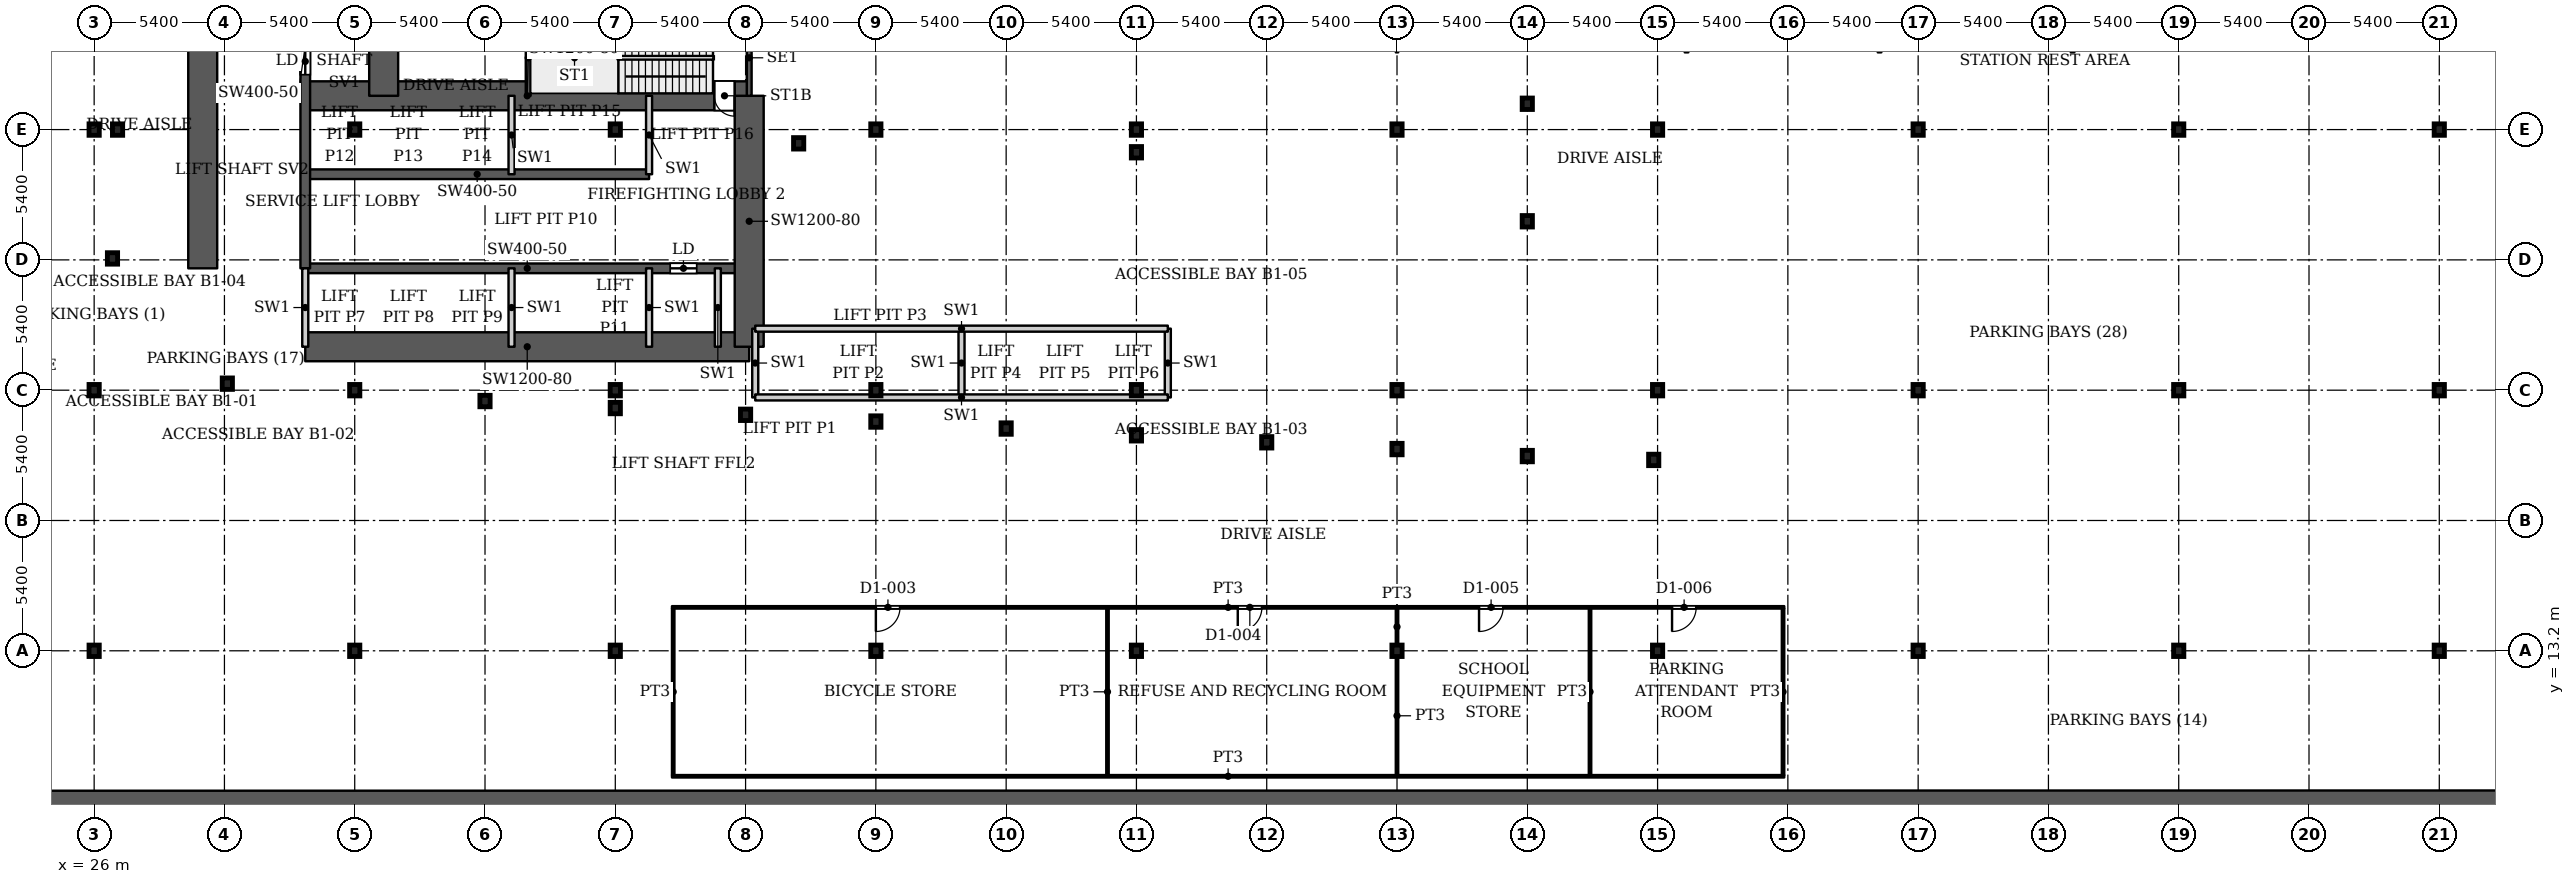
"""IFC4 building model, lengths in metres.
Left out: names, types, materials, properties, quantities, classifications, styles, units other than length and angle.
Written with IfcOpenShell. Run it as: python <this file> out.ifc"""

import sys

from ifc_helpers import new_model, si_unit, direction, frame, frame_2d, origin, origin_2d, place, context, subcontext, project, spatial, rectangle, i_section, extrude, source, transform, mapped, element, fill, save


model = new_model("IFC4")
c1 = context("Model", 3, precision=1e-05, world=origin(), true_north=direction((0.0, 1.0)))
c2 = subcontext(c1, "Body", "Model", "MODEL_VIEW")
j1 = project(units=[si_unit("LENGTHUNIT", "METRE"), si_unit("PLANEANGLEUNIT", "RADIAN")], contexts=[c1])
p1 = place(None, origin())
s1 = spatial("IfcSite", under=j1, at=p1, CompositionType="ELEMENT")
p2 = place(p1, origin())
s2 = spatial("IfcBuilding", under=s1, at=p2, CompositionType="ELEMENT")
p3 = place(p2, frame((0.0, 0.0, -5.0)))
s3 = spatial("IfcBuildingStorey", under=s2, at=p3, CompositionType="ELEMENT", Elevation=-5.0)
for number, where, z_axis, x_axis in (
    (1, (26.0, 13.2, 0.0), (0.0, 0.0, 1.0), (1.0, 0.0, 0.0)),
    (2, (36.8, 13.2, 0.0), (0.0, 0.0, 1.0), (1.0, 0.0, 0.0)),
    (3, (47.6, 13.2, 0.0), (0.0, 0.0, 1.0), (1.0, 0.0, 0.0)),
    (4, (58.4, 13.2, 0.0), (0.0, 0.0, 1.0), (1.0, 0.0, 0.0)),
    (5, (69.2, 13.2, 0.0), (0.0, 0.0, 1.0), (1.0, 0.0, 0.0)),
    (6, (80.0, 13.2, 0.0), (0.0, 0.0, 1.0), (1.0, 0.0, 0.0)),
    (7, (90.8, 13.2, 0.0), (0.0, 0.0, 1.0), (1.0, 0.0, 0.0)),
    (8, (101.6, 13.2, 0.0), (0.0, 0.0, 1.0), (1.0, 0.0, 0.0)),
    (9, (112.4, 13.2, 0.0), (0.0, 0.0, 1.0), (1.0, 0.0, 0.0)),
    (10, (123.2, 13.2, 0.0), (0.0, 0.0, 1.0), (1.0, 0.0, 0.0)),
    (11, (26.0, 24.0, 0.0), (0.0, 0.0, 1.0), (1.0, 0.0, 0.0)),
    (12, (36.8, 24.0, 0.0), (0.0, 0.0, 1.0), (1.0, 0.0, 0.0)),
    (13, (47.6, 24.0, 0.0), (0.0, 0.0, 1.0), (1.0, 0.0, 0.0)),
    (14, (58.4, 24.0, 0.0), (0.0, 0.0, 1.0), (1.0, 0.0, 0.0)),
    (15, (69.2, 24.0, 0.0), (0.0, 0.0, 1.0), (1.0, 0.0, 0.0)),
    (16, (80.0, 24.0, 0.0), (0.0, 0.0, 1.0), (1.0, 0.0, 0.0)),
    (17, (90.8, 24.0, 0.0), (0.0, 0.0, 1.0), (1.0, 0.0, 0.0)),
    (18, (101.6, 24.0, 0.0), (0.0, 0.0, 1.0), (1.0, 0.0, 0.0)),
    (19, (112.4, 24.0, 0.0), (0.0, 0.0, 1.0), (1.0, 0.0, 0.0)),
    (20, (123.2, 24.0, 0.0), (0.0, 0.0, 1.0), (1.0, 0.0, 0.0)),
    (21, (26.0, 34.8, 0.0), (0.0, 0.0, 1.0), (1.0, 0.0, 0.0)),
    (22, (36.8, 34.8, 0.0), (0.0, 0.0, 1.0), (1.0, 0.0, 0.0)),
    (23, (47.6, 34.8, 0.0), (0.0, 0.0, 1.0), (1.0, 0.0, 0.0)),
    (24, (58.4, 34.8, 0.0), (0.0, 0.0, 1.0), (1.0, 0.0, 0.0)),
    (25, (69.2, 34.8, 0.0), (0.0, 0.0, 1.0), (1.0, 0.0, 0.0)),
    (26, (80.0, 34.8, 0.0), (0.0, 0.0, 1.0), (1.0, 0.0, 0.0)),
    (27, (90.8, 34.8, 0.0), (0.0, 0.0, 1.0), (1.0, 0.0, 0.0)),
    (28, (101.6, 34.8, 0.0), (0.0, 0.0, 1.0), (1.0, 0.0, 0.0)),
    (29, (112.4, 34.8, 0.0), (0.0, 0.0, 1.0), (1.0, 0.0, 0.0)),
    (30, (123.2, 34.8, 0.0), (0.0, 0.0, 1.0), (1.0, 0.0, 0.0)),
    (31, (90.64, 21.11, 0.0), (0.0, 0.0, 1.0), (1.0, 0.0, 0.0)),
    (32, (85.4, 21.27, 0.0), (0.0, 0.0, 1.0), (1.0, 0.0, 0.0)),
    (33, (80.0, 21.56, 0.0), (0.0, 0.0, 1.0), (1.0, 0.0, 0.0)),
    (34, (74.6, 21.84, 0.0), (0.0, 0.0, 1.0), (1.0, 0.0, 0.0)),
    (35, (69.2, 22.13, 0.0), (0.0, 0.0, 1.0), (1.0, 0.0, 0.0)),
    (36, (63.8, 22.41, 0.0), (0.0, 0.0, 1.0), (1.0, 0.0, 0.0)),
    (37, (58.4, 22.7, 0.0), (0.0, 0.0, 1.0), (1.0, 0.0, 0.0)),
    (38, (53.0, 22.98, 0.0), (0.0, 0.0, 1.0), (1.0, 0.0, 0.0)),
    (39, (47.6, 23.26, 0.0), (0.0, 0.0, 1.0), (1.0, 0.0, 0.0)),
    (40, (42.2, 23.55, 0.0), (0.0, 0.0, 1.0), (1.0, 0.0, 0.0)),
    (41, (31.52, 24.27, 0.0), (0.0, 0.0, 1.0), (1.0, 0.0, 0.0)),
    (42, (26.76, 29.46, 0.0), (0.0, 0.0, 1.0), (1.0, 0.0, 0.0)),
    (43, (26.97, 34.8, 0.0), (0.0, 0.0, 1.0), (1.0, 0.0, 0.0)),
    (44, (85.4, 31.0, 0.0), (0.0, 0.0, 1.0), (1.0, 0.0, 0.0)),
    (45, (69.2, 33.86, 0.0), (0.0, 0.0, 1.0), (1.0, 0.0, 0.0)),
    (46, (55.2, 34.23, 0.0), (0.0, 0.0, 1.0), (1.0, 0.0, 0.0)),
    (47, (85.4, 35.87, 0.0), (0.0, 0.0, 1.0), (1.0, 0.0, 0.0)),
):
    element("IfcColumn", number, at=place(p3, frame(where, z_axis=z_axis, x_axis=x_axis)), inside=s3, PredefinedType="COLUMN", context=c2, shape_type="SweptSolid", body=[
        extrude(i_section(OverallWidth=0.424, OverallDepth=0.474, WebThickness=0.048, FlangeThickness=0.077, FilletRadius=0.014, at=origin_2d()), origin(), (0.0, 0.0, 1.0), 5.0),
    ])
p4 = place(p3, frame((34.75, 25.8, 0.0), z_axis=(0.0, 0.0, 1.0), x_axis=(1.0, 0.0, 0.0)))
e48 = element("IfcWall", 48, at=p4, inside=s3, PredefinedType="SHEAR", context=c2, shape_type="SweptSolid", body=[
    extrude(rectangle(XDim=18.4, YDim=1.2, at=frame_2d((9.2, 0.0))), origin(), (0.0, 0.0, 1.0), 5.0),
])
p5 = place(p3, frame((34.75, 29.05, 0.0), z_axis=(0.0, 0.0, 1.0), x_axis=(1.0, 0.0, 0.0)))
e49 = element("IfcWall", 49, at=p5, inside=s3, PredefinedType="SHEAR", context=c2, shape_type="SweptSolid", body=[
    extrude(rectangle(XDim=18.4, YDim=0.4, at=frame_2d((9.2, 0.0))), origin(), (0.0, 0.0, 1.0), 5.0),
])
p6 = place(p5, frame((15.125, 0.0, 0.0)))
e50 = element("IfcOpeningElement", 50, at=p6, cuts=e49, PredefinedType="OPENING", context=c2, shape_type="SweptSolid", body=[
    extrude(rectangle(XDim=1.1, YDim=2.2, at=frame_2d((0.55, 1.1))), frame((0.0, 0.21, 0.0), z_axis=(0.0, -1.0, 0.0), x_axis=(1.0, 0.0, 0.0)), (0.0, 0.0, 1.0), 0.42),
])
p7 = place(p3, frame((34.75, 32.95, 0.0), z_axis=(0.0, 0.0, 1.0), x_axis=(1.0, 0.0, 0.0)))
e51 = element("IfcWall", 51, at=p7, inside=s3, PredefinedType="SHEAR", context=c2, shape_type="SweptSolid", body=[
    extrude(rectangle(XDim=14.25, YDim=0.4, at=frame_2d((7.125, 0.0))), origin(), (0.0, 0.0, 1.0), 5.0),
])
p8 = place(p3, frame((34.75, 36.2, 0.0), z_axis=(0.0, 0.0, 1.0), x_axis=(1.0, 0.0, 0.0)))
e52 = element("IfcWall", 52, at=p8, inside=s3, PredefinedType="SHEAR", context=c2, shape_type="SweptSolid", body=[
    extrude(rectangle(XDim=18.4, YDim=1.2, at=frame_2d((9.2, 0.0))), origin(), (0.0, 0.0, 1.0), 5.0),
])
p9 = place(p8, frame((16.955, 0.0, 0.0)))
e53 = element("IfcOpeningElement", 53, at=p9, cuts=e52, PredefinedType="OPENING", context=c2, shape_type="SweptSolid", body=[
    extrude(rectangle(XDim=0.843, YDim=2.2, at=frame_2d((0.421, 1.1))), frame((0.0, 0.61, 0.0), z_axis=(0.0, -1.0, 0.0), x_axis=(1.0, 0.0, 0.0)), (0.0, 0.0, 1.0), 1.22),
])
p10 = place(p3, frame((34.75, 29.05, 0.0), z_axis=(0.0, 0.0, 1.0), x_axis=(0.0, 1.0, 0.0)))
e54 = element("IfcWall", 54, at=p10, inside=s3, PredefinedType="SHEAR", context=c2, shape_type="SweptSolid", body=[
    extrude(rectangle(XDim=18.45, YDim=0.4, at=frame_2d((9.225, 0.0))), origin(), (0.0, 0.0, 1.0), 5.0),
])
p11 = place(p10, frame((8.025, 0.0, 0.0)))
e55 = element("IfcOpeningElement", 55, at=p11, cuts=e54, PredefinedType="OPENING", context=c2, shape_type="SweptSolid", body=[
    extrude(rectangle(XDim=1.1, YDim=2.2, at=frame_2d((0.55, 1.1))), frame((0.0, 0.21, 0.0), z_axis=(0.0, -1.0, 0.0), x_axis=(1.0, 0.0, 0.0)), (0.0, 0.0, 1.0), 0.42),
])
p12 = place(p10, frame((10.875, 0.0, 0.0)))
e56 = element("IfcOpeningElement", 56, at=p12, cuts=e54, PredefinedType="OPENING", context=c2, shape_type="SweptSolid", body=[
    extrude(rectangle(XDim=1.1, YDim=2.2, at=frame_2d((0.55, 1.1))), frame((0.0, 0.21, 0.0), z_axis=(0.0, -1.0, 0.0), x_axis=(1.0, 0.0, 0.0)), (0.0, 0.0, 1.0), 0.42),
])
p13 = place(p10, frame((13.725, 0.0, 0.0)))
e57 = element("IfcOpeningElement", 57, at=p13, cuts=e54, PredefinedType="OPENING", context=c2, shape_type="SweptSolid", body=[
    extrude(rectangle(XDim=1.1, YDim=2.2, at=frame_2d((0.55, 1.1))), frame((0.0, 0.21, 0.0), z_axis=(0.0, -1.0, 0.0), x_axis=(1.0, 0.0, 0.0)), (0.0, 0.0, 1.0), 0.42),
])
p14 = place(p10, frame((15.95, 0.0, 0.0)))
e58 = element("IfcOpeningElement", 58, at=p14, cuts=e54, PredefinedType="OPENING", context=c2, shape_type="SweptSolid", body=[
    extrude(rectangle(XDim=1.1, YDim=2.2, at=frame_2d((0.55, 1.1))), frame((0.0, 0.21, 0.0), z_axis=(0.0, -1.0, 0.0), x_axis=(1.0, 0.0, 0.0)), (0.0, 0.0, 1.0), 0.42),
])
p15 = place(p3, frame((38.0, 36.2, 0.0), z_axis=(0.0, 0.0, 1.0), x_axis=(0.0, 1.0, 0.0)))
e59 = element("IfcWall", 59, at=p15, inside=s3, PredefinedType="SHEAR", context=c2, shape_type="SweptSolid", body=[
    extrude(rectangle(XDim=8.55, YDim=1.2, at=frame_2d((4.275, 0.0))), origin(), (0.0, 0.0, 1.0), 5.0),
])
p16 = place(p3, frame((30.5, 29.05, 0.0), z_axis=(0.0, 0.0, 1.0), x_axis=(0.0, 1.0, 0.0)))
e60 = element("IfcWall", 60, at=p16, inside=s3, PredefinedType="SHEAR", context=c2, shape_type="SweptSolid", body=[
    extrude(rectangle(XDim=18.45, YDim=1.2, at=frame_2d((9.225, 0.0))), origin(), (0.0, 0.0, 1.0), 5.0),
])
p17 = place(p3, frame((53.15, 25.8, 0.0), z_axis=(0.0, 0.0, 1.0), x_axis=(0.0, 1.0, 0.0)))
e61 = element("IfcWall", 61, at=p17, inside=s3, PredefinedType="SHEAR", context=c2, shape_type="SweptSolid", body=[
    extrude(rectangle(XDim=10.4, YDim=1.2, at=frame_2d((5.2, 0.0))), origin(), (0.0, 0.0, 1.0), 5.0),
])
p18 = place(p3, frame((126.261, 7.011, 0.0), z_axis=(0.0, 0.0, 1.0), x_axis=(-0.999999994851, -0.000101480029, 0.0)))
e62 = element("IfcWall", 62, at=p18, inside=s3, PredefinedType="SOLIDWALL", context=c2, shape_type="SweptSolid", body=[
    extrude(rectangle(XDim=108.261, YDim=0.8, at=frame_2d((54.13, 0.0))), origin(), (0.0, 0.0, 1.0), 5.0),
])
for number, where, z_axis, x_axis in (
    (63, (43.99, 36.2, 0.0), (0.0, 0.0, 1.0), (0.0, 1.0, 0.0)),
    (64, (53.15, 36.2, 0.0), (0.0, 0.0, 1.0), (0.0, 1.0, 0.0)),
):
    element("IfcWall", number, at=place(p3, frame(where, z_axis=z_axis, x_axis=x_axis)), inside=s3, PredefinedType="SHEAR", context=c2, shape_type="SweptSolid", body=[
        extrude(rectangle(XDim=3.15, YDim=0.2, at=frame_2d((1.575, 0.0))), origin(), (0.0, 0.0, 1.0), 5.0),
    ])
for number, where, z_axis, x_axis in (
    (65, (34.75, 25.8, 0.0), (0.0, 0.0, 1.0), (0.0, 1.0, 0.0)),
    (66, (43.3, 25.8, 0.0), (0.0, 0.0, 1.0), (0.0, 1.0, 0.0)),
    (67, (43.3, 32.95, 0.0), (0.0, 0.0, 1.0), (0.0, 1.0, 0.0)),
    (68, (49.0, 25.8, 0.0), (0.0, 0.0, 1.0), (0.0, 1.0, 0.0)),
    (69, (49.0, 32.95, 0.0), (0.0, 0.0, 1.0), (0.0, 1.0, 0.0)),
    (70, (51.85, 25.8, 0.0), (0.0, 0.0, 1.0), (0.0, 1.0, 0.0)),
):
    element("IfcWall", number, at=place(p3, frame(where, z_axis=z_axis, x_axis=x_axis)), inside=s3, PredefinedType="PARTITIONING", context=c2, shape_type="SweptSolid", body=[
        extrude(rectangle(XDim=3.25, YDim=0.25, at=frame_2d((1.625, 0.0))), origin(), (0.0, 0.0, 1.0), 5.0),
    ])
for number, where, z_axis, x_axis in (
    (71, (53.4, 23.7, 0.0), (0.0, 0.0, 1.0), (0.0, 1.0, 0.0)),
    (72, (61.95, 23.7, 0.0), (0.0, 0.0, 1.0), (0.0, 1.0, 0.0)),
    (73, (70.5, 23.7, 0.0), (0.0, 0.0, 1.0), (0.0, 1.0, 0.0)),
):
    element("IfcWall", number, at=place(p3, frame(where, z_axis=z_axis, x_axis=x_axis)), inside=s3, PredefinedType="PARTITIONING", context=c2, shape_type="SweptSolid", body=[
        extrude(rectangle(XDim=2.85, YDim=0.25, at=frame_2d((1.425, 0.0))), origin(), (0.0, 0.0, 1.0), 5.0),
    ])
for number, where, z_axis, x_axis in (
    (74, (53.4, 23.7, 0.0), (0.0, 0.0, 1.0), (1.0, 0.0, 0.0)),
    (75, (53.4, 26.55, 0.0), (0.0, 0.0, 1.0), (1.0, 0.0, 0.0)),
):
    element("IfcWall", number, at=place(p3, frame(where, z_axis=z_axis, x_axis=x_axis)), inside=s3, PredefinedType="PARTITIONING", context=c2, shape_type="SweptSolid", body=[
        extrude(rectangle(XDim=17.1, YDim=0.25, at=frame_2d((8.55, 0.0))), origin(), (0.0, 0.0, 1.0), 5.0),
    ])
p19 = place(p3, frame((49.95, 8.0, 0.0), z_axis=(0.0, 0.0, 1.0), x_axis=(1.0, 0.0, 0.0)))
e76 = element("IfcWall", 76, at=p19, inside=s3, PredefinedType="PARTITIONING", context=c2, shape_type="SweptSolid", body=[
    extrude(rectangle(XDim=46.1, YDim=0.1, at=frame_2d((23.05, 0.0))), origin(), (0.0, 0.0, 1.0), 4.58),
])
p20 = place(p3, frame((49.95, 15.0, 0.0), z_axis=(0.0, 0.0, 1.0), x_axis=(1.0, 0.0, 0.0)))
e77 = element("IfcWall", 77, at=p20, inside=s3, PredefinedType="PARTITIONING", context=c2, shape_type="SweptSolid", body=[
    extrude(rectangle(XDim=46.1, YDim=0.1, at=frame_2d((23.05, 0.0))), origin(), (0.0, 0.0, 1.0), 4.58),
])
p21 = place(p20, frame((8.45, 0.0, 0.0)))
e78 = element("IfcOpeningElement", 78, at=p21, cuts=e77, PredefinedType="OPENING", context=c2, shape_type="SweptSolid", body=[
    extrude(rectangle(XDim=1.0, YDim=2.1, at=frame_2d((0.5, 1.05))), frame((0.0, 0.06, 0.0), z_axis=(0.0, -1.0, 0.0), x_axis=(1.0, 0.0, 0.0)), (0.0, 0.0, 1.0), 0.12),
])
p22 = place(p20, frame((23.45, 0.0, 0.0)))
e79 = element("IfcOpeningElement", 79, at=p22, cuts=e77, PredefinedType="OPENING", context=c2, shape_type="SweptSolid", body=[
    extrude(rectangle(XDim=1.0, YDim=2.1, at=frame_2d((0.5, 1.05))), frame((0.0, 0.06, 0.0), z_axis=(0.0, -1.0, 0.0), x_axis=(1.0, 0.0, 0.0)), (0.0, 0.0, 1.0), 0.12),
])
p23 = place(p20, frame((33.45, 0.0, 0.0)))
e80 = element("IfcOpeningElement", 80, at=p23, cuts=e77, PredefinedType="OPENING", context=c2, shape_type="SweptSolid", body=[
    extrude(rectangle(XDim=1.0, YDim=2.1, at=frame_2d((0.5, 1.05))), frame((0.0, 0.06, 0.0), z_axis=(0.0, -1.0, 0.0), x_axis=(1.0, 0.0, 0.0)), (0.0, 0.0, 1.0), 0.12),
])
p24 = place(p20, frame((41.45, 0.0, 0.0)))
e81 = element("IfcOpeningElement", 81, at=p24, cuts=e77, PredefinedType="OPENING", context=c2, shape_type="SweptSolid", body=[
    extrude(rectangle(XDim=1.0, YDim=2.1, at=frame_2d((0.5, 1.05))), frame((0.0, 0.06, 0.0), z_axis=(0.0, -1.0, 0.0), x_axis=(1.0, 0.0, 0.0)), (0.0, 0.0, 1.0), 0.12),
])
for number, where, z_axis, x_axis in (
    (82, (50.0, 8.05, 0.0), (0.0, 0.0, 1.0), (0.0, 1.0, 0.0)),
    (83, (68.0, 8.05, 0.0), (0.0, 0.0, 1.0), (0.0, 1.0, 0.0)),
):
    element("IfcWall", number, at=place(p3, frame(where, z_axis=z_axis, x_axis=x_axis)), inside=s3, PredefinedType="PARTITIONING", context=c2, shape_type="SweptSolid", body=[
        extrude(rectangle(XDim=6.9, YDim=0.1, at=frame_2d((3.45, 0.0))), origin(), (0.0, 0.0, 1.0), 4.58),
    ])
p25 = place(p3, frame((80.0, 8.05, 0.0), z_axis=(0.0, 0.0, 1.0), x_axis=(0.0, 1.0, 0.0)))
e84 = element("IfcWall", 84, at=p25, inside=s3, PredefinedType="PARTITIONING", context=c2, shape_type="SweptSolid", body=[
    extrude(rectangle(XDim=4.914, YDim=0.1, at=frame_2d((2.457, 0.0))), origin(), (0.0, 0.0, 1.0), 4.58),
])
p26 = place(p3, frame((80.0, 13.436, 0.0), z_axis=(0.0, 0.0, 1.0), x_axis=(0.0, 1.0, 0.0)))
e85 = element("IfcWall", 85, at=p26, inside=s3, PredefinedType="PARTITIONING", context=c2, shape_type="SweptSolid", body=[
    extrude(rectangle(XDim=1.514, YDim=0.1, at=frame_2d((0.757, 0.0))), origin(), (0.0, 0.0, 1.0), 4.58),
])
for number, where, z_axis, x_axis in (
    (86, (88.0, 8.05, 0.0), (0.0, 0.0, 1.0), (0.0, 1.0, 0.0)),
    (87, (96.0, 8.05, 0.0), (0.0, 0.0, 1.0), (0.0, 1.0, 0.0)),
):
    element("IfcWall", number, at=place(p3, frame(where, z_axis=z_axis, x_axis=x_axis)), inside=s3, PredefinedType="PARTITIONING", context=c2, shape_type="SweptSolid", body=[
        extrude(rectangle(XDim=6.9, YDim=0.1, at=frame_2d((3.45, 0.0))), origin(), (0.0, 0.0, 1.0), 4.58),
    ])
m1 = source(origin(), c2, "Body", "SweptSolid", [
    extrude(rectangle(XDim=1.1, YDim=2.2, at=frame_2d((0.55, 1.1))), frame((0.0, 0.025, 0.0), z_axis=(0.0, -1.0, 0.0), x_axis=(1.0, 0.0, 0.0)), (0.0, 0.0, 1.0), 0.05),
])
p27 = place(p11, origin())
e88 = element("IfcDoor", 88, at=p27, inside=s3, OperationType="SLIDING_TO_LEFT", PredefinedType="DOOR", context=c2, shape_type="MappedRepresentation", body=[
    mapped(m1, transform((0.0, 0.0, 0.0), x_axis=(1.0, 0.0, 0.0), y_axis=(0.0, 1.0, 0.0), z_axis=(0.0, 0.0, 1.0), scale=1.0)),
])
fill(e55, e88)
p28 = place(p6, origin())
e89 = element("IfcDoor", 89, at=p28, inside=s3, OperationType="SLIDING_TO_LEFT", PredefinedType="DOOR", context=c2, shape_type="MappedRepresentation", body=[
    mapped(m1, transform((0.0, 0.0, 0.0), x_axis=(1.0, 0.0, 0.0), y_axis=(0.0, 1.0, 0.0), z_axis=(0.0, 0.0, 1.0), scale=1.0)),
])
fill(e50, e89)
m2 = source(origin(), c2, "Body", "SweptSolid", [
    extrude(rectangle(XDim=0.843, YDim=2.2, at=frame_2d((0.421, 1.1))), frame((0.0, 0.025, 0.0), z_axis=(0.0, -1.0, 0.0), x_axis=(1.0, 0.0, 0.0)), (0.0, 0.0, 1.0), 0.05),
])
p29 = place(p9, origin())
e90 = element("IfcDoor", 90, at=p29, inside=s3, OperationType="SINGLE_SWING_RIGHT", PredefinedType="DOOR", context=c2, shape_type="MappedRepresentation", body=[
    mapped(m2, transform((0.0, 0.0, 0.0), x_axis=(1.0, 0.0, 0.0), y_axis=(0.0, 1.0, 0.0), z_axis=(0.0, 0.0, 1.0), scale=1.0)),
])
fill(e53, e90)
m3 = source(origin(), c2, "Body", "SweptSolid", [
    extrude(rectangle(XDim=1.0, YDim=2.1, at=frame_2d((0.5, 1.05))), frame((0.0, 0.025, 0.0), z_axis=(0.0, -1.0, 0.0), x_axis=(1.0, 0.0, 0.0)), (0.0, 0.0, 1.0), 0.05),
])
p30 = place(p21, origin())
e91 = element("IfcDoor", 91, at=p30, inside=s3, OperationType="SINGLE_SWING_RIGHT", PredefinedType="DOOR", context=c2, shape_type="MappedRepresentation", body=[
    mapped(m3, transform((0.0, 0.0, 0.0), x_axis=(1.0, 0.0, 0.0), y_axis=(0.0, 1.0, 0.0), z_axis=(0.0, 0.0, 1.0), scale=1.0)),
])
fill(e78, e91)
p31 = place(p22, origin())
e92 = element("IfcDoor", 92, at=p31, inside=s3, OperationType="SINGLE_SWING_RIGHT", PredefinedType="DOOR", context=c2, shape_type="MappedRepresentation", body=[
    mapped(m3, transform((0.0, 0.0, 0.0), x_axis=(1.0, 0.0, 0.0), y_axis=(0.0, 1.0, 0.0), z_axis=(0.0, 0.0, 1.0), scale=1.0)),
])
fill(e79, e92)
p32 = place(p23, origin())
e93 = element("IfcDoor", 93, at=p32, inside=s3, OperationType="SINGLE_SWING_RIGHT", PredefinedType="DOOR", context=c2, shape_type="MappedRepresentation", body=[
    mapped(m3, transform((0.0, 0.0, 0.0), x_axis=(1.0, 0.0, 0.0), y_axis=(0.0, 1.0, 0.0), z_axis=(0.0, 0.0, 1.0), scale=1.0)),
])
fill(e80, e93)
p33 = place(p24, origin())
e94 = element("IfcDoor", 94, at=p33, inside=s3, OperationType="SINGLE_SWING_RIGHT", PredefinedType="DOOR", context=c2, shape_type="MappedRepresentation", body=[
    mapped(m3, transform((0.0, 0.0, 0.0), x_axis=(1.0, 0.0, 0.0), y_axis=(0.0, 1.0, 0.0), z_axis=(0.0, 0.0, 1.0), scale=1.0)),
])
fill(e81, e94)
save(model, sys.argv[1])
